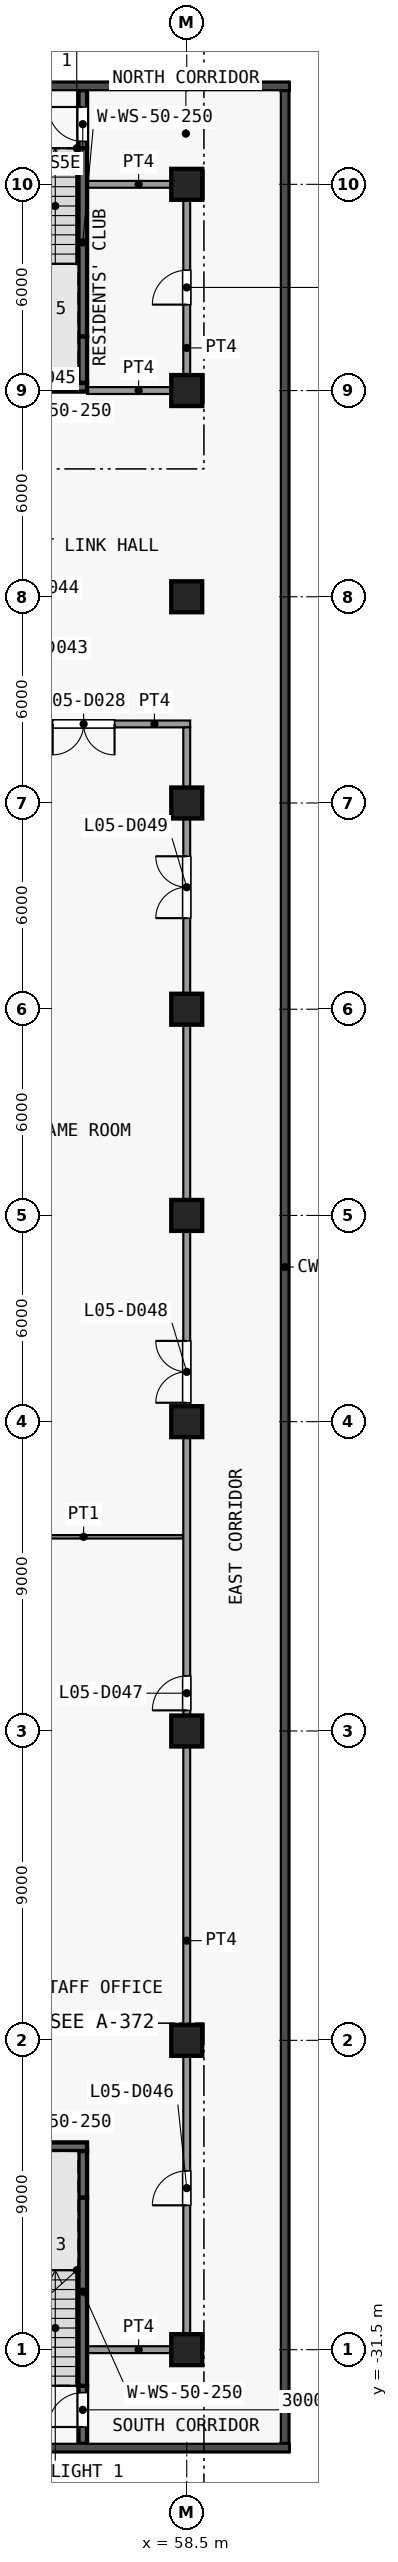
"""IFC4 building model, lengths in metres.
Left out: names, types, materials, properties, quantities, classifications, styles, units other than length and angle.
Written with IfcOpenShell. Run it as: python <this file> out.ifc"""

import sys

from ifc_helpers import new_model, si_unit, direction, frame, frame_2d, origin, origin_2d, place, context, subcontext, project, spatial, rectangle, extrude, element, fill, save


model = new_model("IFC4")
c1 = context("Model", 3, precision=1e-05, world=origin(), true_north=direction((0.0, 1.0)))
c2 = subcontext(c1, "Body", "Model", "MODEL_VIEW")
j1 = project(units=[si_unit("LENGTHUNIT", "METRE"), si_unit("PLANEANGLEUNIT", "RADIAN")], contexts=[c1])
p1 = place(None, origin())
s1 = spatial("IfcSite", under=j1, at=p1, CompositionType="ELEMENT")
p2 = place(p1, origin())
s2 = spatial("IfcBuilding", under=s1, at=p2, CompositionType="ELEMENT")
p3 = place(p2, frame((0.0, 0.0, 28.0)))
s3 = spatial("IfcBuildingStorey", under=s2, at=p3, CompositionType="ELEMENT", Elevation=28.0)
for number, where, z_axis, x_axis in (
    (1, (58.5, -31.5, 0.0), (0.0, 0.0, 1.0), (1.0, 0.0, 0.0)),
    (2, (58.5, -22.5, 0.0), (0.0, 0.0, 1.0), (1.0, 0.0, 0.0)),
    (3, (58.5, -13.5, 0.0), (0.0, 0.0, 1.0), (1.0, 0.0, 0.0)),
    (4, (58.5, -4.5, 0.0), (0.0, 0.0, 1.0), (1.0, 0.0, 0.0)),
    (5, (58.5, 1.5, 0.0), (0.0, 0.0, 1.0), (1.0, 0.0, 0.0)),
    (6, (58.5, 7.5, 0.0), (0.0, 0.0, 1.0), (1.0, 0.0, 0.0)),
    (7, (58.5, 13.5, 0.0), (0.0, 0.0, 1.0), (1.0, 0.0, 0.0)),
    (8, (58.5, 19.5, 0.0), (0.0, 0.0, 1.0), (1.0, 0.0, 0.0)),
    (9, (58.5, 25.5, 0.0), (0.0, 0.0, 1.0), (1.0, 0.0, 0.0)),
    (10, (58.5, 31.5, 0.0), (0.0, 0.0, 1.0), (1.0, 0.0, 0.0)),
):
    element("IfcColumn", number, at=place(p3, frame(where, z_axis=z_axis, x_axis=x_axis)), inside=s3, PredefinedType="COLUMN", context=c2, shape_type="SweptSolid", body=[
        extrude(rectangle(XDim=0.9, YDim=0.9, at=origin_2d()), origin(), (0.0, 0.0, 1.0), 4.5),
    ])
p4 = place(p3, frame((55.475, -34.24, 0.0), z_axis=(0.0, 0.0, 1.0), x_axis=(0.0, 1.0, 0.0)))
e11 = element("IfcWall", 11, at=p4, inside=s3, PredefinedType="SHEAR", context=c2, shape_type="SweptSolid", body=[
    extrude(rectangle(XDim=1.69, YDim=0.25, at=frame_2d((0.845, 0.0))), origin(), (0.0, 0.0, 1.0), 4.1),
])
p5 = place(p4, frame((0.49, 0.0, 0.0)))
e12 = element("IfcOpeningElement", 12, at=p5, cuts=e11, PredefinedType="OPENING", context=c2, shape_type="SweptSolid", body=[
    extrude(rectangle(XDim=1.0, YDim=2.1, at=frame_2d((0.5, 1.05))), frame((0.0, 0.135, 0.0), z_axis=(0.0, -1.0, 0.0), x_axis=(1.0, 0.0, 0.0)), (0.0, 0.0, 1.0), 0.27),
])
p6 = place(p3, frame((55.475, -32.55, 0.0), z_axis=(0.0, 0.0, 1.0), x_axis=(0.0, 1.0, 0.0)))
e13 = element("IfcWall", 13, at=p6, inside=s3, PredefinedType="SHEAR", context=c2, shape_type="SweptSolid", body=[
    extrude(rectangle(XDim=5.48, YDim=0.25, at=frame_2d((2.74, 0.0))), origin(), (0.0, 0.0, 1.0), 4.1),
])
p7 = place(p3, frame((55.475, -27.07, 0.0), z_axis=(0.0, 0.0, 1.0), x_axis=(0.0, 1.0, 0.0)))
e14 = element("IfcWall", 14, at=p7, inside=s3, PredefinedType="SHEAR", context=c2, shape_type="SweptSolid", body=[
    extrude(rectangle(XDim=1.35, YDim=0.25, at=frame_2d((0.675, 0.0))), origin(), (0.0, 0.0, 1.0), 4.1),
])
p8 = place(p3, frame((52.25, -25.595, 0.0), z_axis=(0.0, 0.0, 1.0), x_axis=(1.0, 0.0, 0.0)))
e15 = element("IfcWall", 15, at=p8, inside=s3, PredefinedType="SHEAR", context=c2, shape_type="SweptSolid", body=[
    extrude(rectangle(XDim=3.35, YDim=0.25, at=frame_2d((1.675, 0.0))), origin(), (0.0, 0.0, 1.0), 4.1),
])
p9 = place(p3, frame((55.475, 32.55, 0.0), z_axis=(0.0, 0.0, 1.0), x_axis=(0.0, 1.0, 0.0)))
e16 = element("IfcWall", 16, at=p9, inside=s3, PredefinedType="SHEAR", context=c2, shape_type="SweptSolid", body=[
    extrude(rectangle(XDim=1.69, YDim=0.25, at=frame_2d((0.845, 0.0))), origin(), (0.0, 0.0, 1.0), 4.1),
])
p10 = place(p9, frame((0.2, 0.0, 0.0)))
e17 = element("IfcOpeningElement", 17, at=p10, cuts=e16, PredefinedType="OPENING", context=c2, shape_type="SweptSolid", body=[
    extrude(rectangle(XDim=1.0, YDim=2.1, at=frame_2d((0.5, 1.05))), frame((0.0, 0.135, 0.0), z_axis=(0.0, -1.0, 0.0), x_axis=(1.0, 0.0, 0.0)), (0.0, 0.0, 1.0), 0.27),
])
p11 = place(p3, frame((55.475, 27.07, 0.0), z_axis=(0.0, 0.0, 1.0), x_axis=(0.0, 1.0, 0.0)))
e18 = element("IfcWall", 18, at=p11, inside=s3, PredefinedType="SHEAR", context=c2, shape_type="SweptSolid", body=[
    extrude(rectangle(XDim=5.48, YDim=0.25, at=frame_2d((2.74, 0.0))), origin(), (0.0, 0.0, 1.0), 4.1),
])
p12 = place(p3, frame((55.475, 25.72, 0.0), z_axis=(0.0, 0.0, 1.0), x_axis=(0.0, 1.0, 0.0)))
e19 = element("IfcWall", 19, at=p12, inside=s3, PredefinedType="SHEAR", context=c2, shape_type="SweptSolid", body=[
    extrude(rectangle(XDim=1.35, YDim=0.25, at=frame_2d((0.675, 0.0))), origin(), (0.0, 0.0, 1.0), 4.1),
])
p13 = place(p3, frame((52.25, 25.595, 0.0), z_axis=(0.0, 0.0, 1.0), x_axis=(1.0, 0.0, 0.0)))
e20 = element("IfcWall", 20, at=p13, inside=s3, PredefinedType="SHEAR", context=c2, shape_type="SweptSolid", body=[
    extrude(rectangle(XDim=3.35, YDim=0.25, at=frame_2d((1.675, 0.0))), origin(), (0.0, 0.0, 1.0), 4.1),
])
p14 = place(p3, frame((55.6, -31.5, 0.0), z_axis=(0.0, 0.0, 1.0), x_axis=(1.0, 0.0, 0.0)))
e21 = element("IfcWall", 21, at=p14, inside=s3, PredefinedType="PARTITIONING", context=c2, shape_type="SweptSolid", body=[
    extrude(rectangle(XDim=3.0, YDim=0.2, at=frame_2d((1.5, 0.0))), origin(), (0.0, 0.0, 1.0), 4.1),
])
p15 = place(p3, frame((52.6, -7.85, 0.0), z_axis=(0.0, 0.0, 1.0), x_axis=(1.0, 0.0, 0.0)))
e22 = element("IfcWall", 22, at=p15, inside=s3, PredefinedType="PARTITIONING", context=c2, shape_type="SweptSolid", body=[
    extrude(rectangle(XDim=5.8, YDim=0.1, at=frame_2d((2.9, 0.0))), origin(), (0.0, 0.0, 1.0), 4.1),
])
p16 = place(p3, frame((52.4, 15.8, 0.0), z_axis=(0.0, 0.0, 1.0), x_axis=(1.0, 0.0, 0.0)))
e23 = element("IfcWall", 23, at=p16, inside=s3, PredefinedType="PARTITIONING", context=c2, shape_type="SweptSolid", body=[
    extrude(rectangle(XDim=6.2, YDim=0.2, at=frame_2d((3.1, 0.0))), origin(), (0.0, 0.0, 1.0), 4.1),
])
p17 = place(p16, frame((2.2, 0.0, 0.0)))
e24 = element("IfcOpeningElement", 24, at=p17, cuts=e23, PredefinedType="OPENING", context=c2, shape_type="SweptSolid", body=[
    extrude(rectangle(XDim=1.8, YDim=2.1, at=frame_2d((0.9, 1.05))), frame((0.0, 0.11, 0.0), z_axis=(0.0, -1.0, 0.0), x_axis=(1.0, 0.0, 0.0)), (0.0, 0.0, 1.0), 0.22),
])
for number, where, z_axis, x_axis in (
    (25, (55.6, 25.5, 0.0), (0.0, 0.0, 1.0), (1.0, 0.0, 0.0)),
    (26, (55.6, 31.5, 0.0), (0.0, 0.0, 1.0), (1.0, 0.0, 0.0)),
):
    element("IfcWall", number, at=place(p3, frame(where, z_axis=z_axis, x_axis=x_axis)), inside=s3, PredefinedType="PARTITIONING", context=c2, shape_type="SweptSolid", body=[
        extrude(rectangle(XDim=3.0, YDim=0.2, at=frame_2d((1.5, 0.0))), origin(), (0.0, 0.0, 1.0), 4.1),
    ])
p18 = place(p3, frame((58.5, -31.4, 0.0), z_axis=(0.0, 0.0, 1.0), x_axis=(0.0, 1.0, 0.0)))
e27 = element("IfcWall", 27, at=p18, inside=s3, PredefinedType="PARTITIONING", context=c2, shape_type="SweptSolid", body=[
    extrude(rectangle(XDim=47.1, YDim=0.2, at=frame_2d((23.55, 0.0))), origin(), (0.0, 0.0, 1.0), 4.1),
])
p19 = place(p18, frame((4.1, 0.0, 0.0)))
e28 = element("IfcOpeningElement", 28, at=p19, cuts=e27, PredefinedType="OPENING", context=c2, shape_type="SweptSolid", body=[
    extrude(rectangle(XDim=1.0, YDim=2.1, at=frame_2d((0.5, 1.05))), frame((0.0, 0.11, 0.0), z_axis=(0.0, -1.0, 0.0), x_axis=(1.0, 0.0, 0.0)), (0.0, 0.0, 1.0), 0.22),
])
p20 = place(p18, frame((18.5, 0.0, 0.0)))
e29 = element("IfcOpeningElement", 29, at=p20, cuts=e27, PredefinedType="OPENING", context=c2, shape_type="SweptSolid", body=[
    extrude(rectangle(XDim=1.0, YDim=2.1, at=frame_2d((0.5, 1.05))), frame((0.0, 0.11, 0.0), z_axis=(0.0, -1.0, 0.0), x_axis=(1.0, 0.0, 0.0)), (0.0, 0.0, 1.0), 0.22),
])
p21 = place(p18, frame((27.45, 0.0, 0.0)))
e30 = element("IfcOpeningElement", 30, at=p21, cuts=e27, PredefinedType="OPENING", context=c2, shape_type="SweptSolid", body=[
    extrude(rectangle(XDim=1.8, YDim=2.1, at=frame_2d((0.9, 1.05))), frame((0.0, 0.11, 0.0), z_axis=(0.0, -1.0, 0.0), x_axis=(1.0, 0.0, 0.0)), (0.0, 0.0, 1.0), 0.22),
])
p22 = place(p18, frame((41.55, 0.0, 0.0)))
e31 = element("IfcOpeningElement", 31, at=p22, cuts=e27, PredefinedType="OPENING", context=c2, shape_type="SweptSolid", body=[
    extrude(rectangle(XDim=1.8, YDim=2.1, at=frame_2d((0.9, 1.05))), frame((0.0, 0.11, 0.0), z_axis=(0.0, -1.0, 0.0), x_axis=(1.0, 0.0, 0.0)), (0.0, 0.0, 1.0), 0.22),
])
p23 = place(p3, frame((58.5, 25.6, 0.0), z_axis=(0.0, 0.0, 1.0), x_axis=(0.0, 1.0, 0.0)))
e32 = element("IfcWall", 32, at=p23, inside=s3, PredefinedType="PARTITIONING", context=c2, shape_type="SweptSolid", body=[
    extrude(rectangle(XDim=5.8, YDim=0.2, at=frame_2d((2.9, 0.0))), origin(), (0.0, 0.0, 1.0), 4.1),
])
p24 = place(p23, frame((2.4, 0.0, 0.0)))
e33 = element("IfcOpeningElement", 33, at=p24, cuts=e32, PredefinedType="OPENING", context=c2, shape_type="SweptSolid", body=[
    extrude(rectangle(XDim=1.0, YDim=2.1, at=frame_2d((0.5, 1.05))), frame((0.0, 0.11, 0.0), z_axis=(0.0, -1.0, 0.0), x_axis=(1.0, 0.0, 0.0)), (0.0, 0.0, 1.0), 0.22),
])
p25 = place(p5, origin())
e34 = element("IfcDoor", 34, at=p25, inside=s3, OperationType="SINGLE_SWING_LEFT", PredefinedType="DOOR", context=c2, shape_type="SweptSolid", body=[
    extrude(rectangle(XDim=1.0, YDim=2.1, at=frame_2d((0.5, 1.05))), frame((0.0, 0.025, 0.0), z_axis=(0.0, -1.0, 0.0), x_axis=(1.0, 0.0, 0.0)), (0.0, 0.0, 1.0), 0.05),
])
fill(e12, e34)
p26 = place(p10, origin())
e35 = element("IfcDoor", 35, at=p26, inside=s3, OperationType="SINGLE_SWING_RIGHT", PredefinedType="DOOR", context=c2, shape_type="SweptSolid", body=[
    extrude(rectangle(XDim=1.0, YDim=2.1, at=frame_2d((0.5, 1.05))), frame((0.0, 0.025, 0.0), z_axis=(0.0, -1.0, 0.0), x_axis=(1.0, 0.0, 0.0)), (0.0, 0.0, 1.0), 0.05),
])
fill(e17, e35)
p27 = place(p17, origin())
e36 = element("IfcDoor", 36, at=p27, inside=s3, OperationType="DOUBLE_DOOR_SINGLE_SWING", PredefinedType="DOOR", context=c2, shape_type="SweptSolid", body=[
    extrude(rectangle(XDim=1.8, YDim=2.1, at=frame_2d((0.9, 1.05))), frame((0.0, 0.025, 0.0), z_axis=(0.0, -1.0, 0.0), x_axis=(1.0, 0.0, 0.0)), (0.0, 0.0, 1.0), 0.05),
])
fill(e24, e36)
p28 = place(p19, origin())
e37 = element("IfcDoor", 37, at=p28, inside=s3, OperationType="SINGLE_SWING_RIGHT", PredefinedType="DOOR", context=c2, shape_type="SweptSolid", body=[
    extrude(rectangle(XDim=1.0, YDim=2.1, at=frame_2d((0.5, 1.05))), frame((0.0, 0.025, 0.0), z_axis=(0.0, -1.0, 0.0), x_axis=(1.0, 0.0, 0.0)), (0.0, 0.0, 1.0), 0.05),
])
fill(e28, e37)
p29 = place(p20, origin())
e38 = element("IfcDoor", 38, at=p29, inside=s3, OperationType="SINGLE_SWING_RIGHT", PredefinedType="DOOR", context=c2, shape_type="SweptSolid", body=[
    extrude(rectangle(XDim=1.0, YDim=2.1, at=frame_2d((0.5, 1.05))), frame((0.0, 0.025, 0.0), z_axis=(0.0, -1.0, 0.0), x_axis=(1.0, 0.0, 0.0)), (0.0, 0.0, 1.0), 0.05),
])
fill(e29, e38)
p30 = place(p21, origin())
e39 = element("IfcDoor", 39, at=p30, inside=s3, OperationType="DOUBLE_DOOR_SINGLE_SWING", PredefinedType="DOOR", context=c2, shape_type="SweptSolid", body=[
    extrude(rectangle(XDim=1.8, YDim=2.1, at=frame_2d((0.9, 1.05))), frame((0.0, 0.025, 0.0), z_axis=(0.0, -1.0, 0.0), x_axis=(1.0, 0.0, 0.0)), (0.0, 0.0, 1.0), 0.05),
])
fill(e30, e39)
p31 = place(p22, origin())
e40 = element("IfcDoor", 40, at=p31, inside=s3, OperationType="DOUBLE_DOOR_SINGLE_SWING", PredefinedType="DOOR", context=c2, shape_type="SweptSolid", body=[
    extrude(rectangle(XDim=1.8, YDim=2.1, at=frame_2d((0.9, 1.05))), frame((0.0, 0.025, 0.0), z_axis=(0.0, -1.0, 0.0), x_axis=(1.0, 0.0, 0.0)), (0.0, 0.0, 1.0), 0.05),
])
fill(e31, e40)
p32 = place(p24, origin())
e41 = element("IfcDoor", 41, at=p32, inside=s3, OperationType="SINGLE_SWING_RIGHT", PredefinedType="DOOR", context=c2, shape_type="SweptSolid", body=[
    extrude(rectangle(XDim=1.0, YDim=2.1, at=frame_2d((0.5, 1.05))), frame((0.0, 0.025, 0.0), z_axis=(0.0, -1.0, 0.0), x_axis=(1.0, 0.0, 0.0)), (0.0, 0.0, 1.0), 0.05),
])
fill(e33, e41)
save(model, sys.argv[1])
